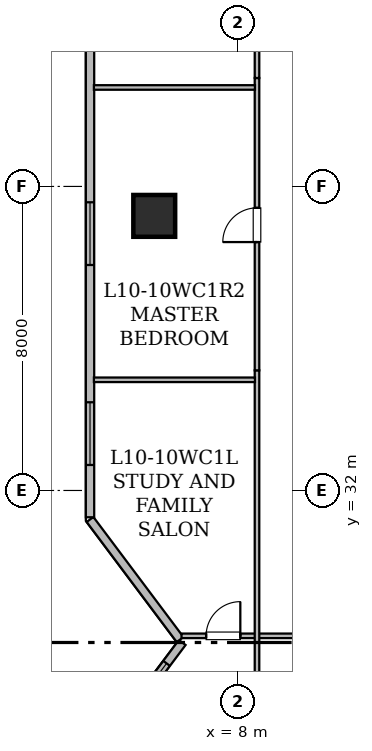
"""IFC4 building model, lengths in metres.
Left out: names, types, materials, properties, quantities, classifications, styles, units other than length and angle.
Written with IfcOpenShell. Run it as: python <this file> out.ifc"""

import sys

from ifc_helpers import new_model, si_unit, direction, frame, frame_2d, origin, origin_2d, place, context, subcontext, project, spatial, rectangle, hollow_rectangle, extrude, element, fill, save


model = new_model("IFC4")
c1 = context("Model", 3, precision=1e-05, world=origin(), true_north=direction((0.0, 1.0)))
c2 = subcontext(c1, "Body", "Model", "MODEL_VIEW")
j1 = project(units=[si_unit("LENGTHUNIT", "METRE"), si_unit("PLANEANGLEUNIT", "RADIAN")], contexts=[c1])
p1 = place(None, origin())
s1 = spatial("IfcSite", under=j1, at=p1, CompositionType="ELEMENT")
p2 = place(p1, origin())
s2 = spatial("IfcBuilding", under=s1, at=p2, CompositionType="ELEMENT")
p3 = place(p2, frame((0.0, 0.0, 44.25)))
s3 = spatial("IfcBuildingStorey", under=s2, at=p3, CompositionType="ELEMENT", Elevation=44.25)
p4 = place(p3, frame((5.8, 39.225, 0.0), z_axis=(0.0, 0.0, 1.0), x_axis=(1.0, 0.0, 0.0)))
e1 = element("IfcColumn", 1, at=p4, inside=s3, PredefinedType="COLUMN", context=c2, shape_type="SweptSolid", body=[
    extrude(hollow_rectangle(XDim=1.1, YDim=1.1, WallThickness=0.055, at=origin_2d()), origin(), (0.0, 0.0, 1.0), 3.65),
])
p5 = place(p3, frame((4.145, 24.809, 0.0), z_axis=(0.0, 0.0, 1.0), x_axis=(0.599823674734, 0.800132213592, 0.0)))
e2 = element("IfcWall", 2, at=p5, inside=s3, PredefinedType="STANDARD", context=c2, shape_type="SweptSolid", body=[
    extrude(rectangle(XDim=3.988, YDim=0.22, at=frame_2d((1.994, 0.0))), origin(), (0.0, 0.0, 1.0), 3.43),
])
p6 = place(p5, frame((1.651, 0.0, 0.85)))
e3 = element("IfcOpeningElement", 3, at=p6, cuts=e2, PredefinedType="OPENING", context=c2, shape_type="SweptSolid", body=[
    extrude(rectangle(XDim=1.65, YDim=1.55, at=frame_2d((0.825, 0.775))), frame((0.0, 0.12, 0.0), z_axis=(0.0, -1.0, 0.0), x_axis=(1.0, 0.0, 0.0)), (0.0, 0.0, 1.0), 0.24),
])
p7 = place(p3, frame((6.48, 28.077, 0.0), z_axis=(0.0, 0.0, 1.0), x_axis=(-0.599960442794, 0.800029666377, 0.0)))
e4 = element("IfcWall", 4, at=p7, inside=s3, PredefinedType="STANDARD", context=c2, shape_type="SweptSolid", body=[
    extrude(rectangle(XDim=3.95, YDim=0.22, at=frame_2d((1.975, 0.0))), origin(), (0.0, 0.0, 1.0), 3.43),
])
p8 = place(p3, frame((4.11, 31.295, 0.0), z_axis=(0.0, 0.0, 1.0), x_axis=(0.0, 1.0, 0.0)))
e5 = element("IfcWall", 5, at=p8, inside=s3, PredefinedType="STANDARD", context=c2, shape_type="SweptSolid", body=[
    extrude(rectangle(XDim=17.459, YDim=0.22, at=frame_2d((8.729, 0.0))), origin(), (0.0, 0.0, 1.0), 3.43),
])
p9 = place(p8, frame((1.376, 0.0, 0.85)))
e6 = element("IfcOpeningElement", 6, at=p9, cuts=e5, PredefinedType="OPENING", context=c2, shape_type="SweptSolid", body=[
    extrude(rectangle(XDim=1.65, YDim=1.55, at=frame_2d((0.825, 0.775))), frame((0.0, 0.12, 0.0), z_axis=(0.0, -1.0, 0.0), x_axis=(1.0, 0.0, 0.0)), (0.0, 0.0, 1.0), 0.24),
])
p10 = place(p8, frame((6.638, 0.0, 0.85)))
e7 = element("IfcOpeningElement", 7, at=p10, cuts=e5, PredefinedType="OPENING", context=c2, shape_type="SweptSolid", body=[
    extrude(rectangle(XDim=1.65, YDim=1.55, at=frame_2d((0.825, 0.775))), frame((0.0, 0.12, 0.0), z_axis=(0.0, -1.0, 0.0), x_axis=(1.0, 0.0, 0.0)), (0.0, 0.0, 1.0), 0.24),
])
p11 = place(p8, frame((12.8, 0.0, 0.85)))
e8 = element("IfcOpeningElement", 8, at=p11, cuts=e5, PredefinedType="OPENING", context=c2, shape_type="SweptSolid", body=[
    extrude(rectangle(XDim=1.65, YDim=1.55, at=frame_2d((0.825, 0.775))), frame((0.0, 0.12, 0.0), z_axis=(0.0, -1.0, 0.0), x_axis=(1.0, 0.0, 0.0)), (0.0, 0.0, 1.0), 0.24),
])
p12 = place(p3, frame((6.518, 28.175, 0.0), z_axis=(0.0, 0.0, 1.0), x_axis=(1.0, 0.0, 0.0)))
e9 = element("IfcWall", 9, at=p12, inside=s3, PredefinedType="PARTITIONING", context=c2, shape_type="SweptSolid", body=[
    extrude(rectangle(XDim=4.651, YDim=0.12, at=frame_2d((2.325, 0.0))), origin(), (0.0, 0.0, 1.0), 3.43),
])
p13 = place(p12, frame((0.647, 0.0, 0.0)))
e10 = element("IfcOpeningElement", 10, at=p13, cuts=e9, PredefinedType="OPENING", context=c2, shape_type="SweptSolid", body=[
    extrude(rectangle(XDim=0.9, YDim=2.1, at=frame_2d((0.45, 1.05))), frame((0.0, 0.07, 0.0), z_axis=(0.0, -1.0, 0.0), x_axis=(1.0, 0.0, 0.0)), (0.0, 0.0, 1.0), 0.14),
])
p14 = place(p3, frame((8.504, 25.51, 0.0), z_axis=(0.0, 0.0, 1.0), x_axis=(0.0, 1.0, 0.0)))
e11 = element("IfcWall", 11, at=p14, inside=s3, PredefinedType="PARTITIONING", context=c2, shape_type="SweptSolid", body=[
    extrude(rectangle(XDim=9.651, YDim=0.12, at=frame_2d((4.825, 0.0))), origin(), (0.0, 0.0, 1.0), 3.43),
])
p15 = place(p3, frame((8.504, 35.161, 0.0), z_axis=(0.0, 0.0, 1.0), x_axis=(0.0, 1.0, 0.0)))
e12 = element("IfcWall", 12, at=p15, inside=s3, PredefinedType="PARTITIONING", context=c2, shape_type="SweptSolid", body=[
    extrude(rectangle(XDim=7.692, YDim=0.12, at=frame_2d((3.846, 0.0))), origin(), (0.0, 0.0, 1.0), 2.647),
])
p16 = place(p15, frame((3.375, 0.0, 0.0)))
e13 = element("IfcOpeningElement", 13, at=p16, cuts=e12, PredefinedType="OPENING", context=c2, shape_type="SweptSolid", body=[
    extrude(rectangle(XDim=0.9, YDim=2.1, at=frame_2d((0.45, 1.05))), frame((0.0, 0.07, 0.0), z_axis=(0.0, -1.0, 0.0), x_axis=(1.0, 0.0, 0.0)), (0.0, 0.0, 1.0), 0.14),
])
p17 = place(p3, frame((8.504, 42.853, 0.0), z_axis=(0.0, 0.0, 1.0), x_axis=(0.0, 1.0, 0.0)))
e14 = element("IfcWall", 14, at=p17, inside=s3, PredefinedType="PARTITIONING", context=c2, shape_type="SweptSolid", body=[
    extrude(rectangle(XDim=4.633, YDim=0.12, at=frame_2d((2.316, 0.0))), origin(), (0.0, 0.0, 1.0), 2.803),
])
p18 = place(p17, frame((1.846, 0.0, 0.0)))
e15 = element("IfcOpeningElement", 15, at=p18, cuts=e14, PredefinedType="OPENING", context=c2, shape_type="SweptSolid", body=[
    extrude(rectangle(XDim=0.9, YDim=2.1, at=frame_2d((0.45, 1.05))), frame((0.0, 0.07, 0.0), z_axis=(0.0, -1.0, 0.0), x_axis=(1.0, 0.0, 0.0)), (0.0, 0.0, 1.0), 0.14),
])
for number, where, z_axis, x_axis in (
    (16, (4.212, 34.912, 0.0), (0.0, 0.0, 1.0), (1.0, 0.0, 0.0)),
    (17, (4.212, 42.604, 0.0), (0.0, 0.0, 1.0), (1.0, 0.0, 0.0)),
):
    element("IfcWall", number, at=place(p3, frame(where, z_axis=z_axis, x_axis=x_axis)), inside=s3, PredefinedType="PARTITIONING", context=c2, shape_type="SweptSolid", body=[
        extrude(rectangle(XDim=4.238, YDim=0.12, at=frame_2d((2.119, 0.0))), origin(), (0.0, 0.0, 1.0), 2.803),
    ])
p19 = place(p6, origin())
e18 = element("IfcWindow", 18, at=p19, inside=s3, PartitioningType="SINGLE_PANEL", PredefinedType="WINDOW", context=c2, shape_type="SweptSolid", body=[
    extrude(rectangle(XDim=1.65, YDim=1.55, at=frame_2d((0.825, 0.775))), frame((0.0, 0.03, 0.0), z_axis=(0.0, -1.0, 0.0), x_axis=(1.0, 0.0, 0.0)), (0.0, 0.0, 1.0), 0.06),
])
fill(e3, e18)
p20 = place(p9, origin())
e19 = element("IfcWindow", 19, at=p20, inside=s3, PartitioningType="SINGLE_PANEL", PredefinedType="WINDOW", context=c2, shape_type="SweptSolid", body=[
    extrude(rectangle(XDim=1.65, YDim=1.55, at=frame_2d((0.825, 0.775))), frame((0.0, 0.03, 0.0), z_axis=(0.0, -1.0, 0.0), x_axis=(1.0, 0.0, 0.0)), (0.0, 0.0, 1.0), 0.06),
])
fill(e6, e19)
p21 = place(p10, origin())
e20 = element("IfcWindow", 20, at=p21, inside=s3, PartitioningType="SINGLE_PANEL", PredefinedType="WINDOW", context=c2, shape_type="SweptSolid", body=[
    extrude(rectangle(XDim=1.65, YDim=1.55, at=frame_2d((0.825, 0.775))), frame((0.0, 0.03, 0.0), z_axis=(0.0, -1.0, 0.0), x_axis=(1.0, 0.0, 0.0)), (0.0, 0.0, 1.0), 0.06),
])
fill(e7, e20)
p22 = place(p13, origin())
e21 = element("IfcDoor", 21, at=p22, inside=s3, OperationType="SINGLE_SWING_RIGHT", PredefinedType="DOOR", context=c2, shape_type="SweptSolid", body=[
    extrude(rectangle(XDim=0.9, YDim=2.1, at=frame_2d((0.45, 1.05))), frame((0.0, 0.025, 0.0), z_axis=(0.0, -1.0, 0.0), x_axis=(1.0, 0.0, 0.0)), (0.0, 0.0, 1.0), 0.05),
])
fill(e10, e21)
p23 = place(p16, origin())
e22 = element("IfcDoor", 22, at=p23, inside=s3, OperationType="SINGLE_SWING_LEFT", PredefinedType="DOOR", context=c2, shape_type="SweptSolid", body=[
    extrude(rectangle(XDim=0.9, YDim=2.1, at=frame_2d((0.45, 1.05))), frame((0.0, 0.025, 0.0), z_axis=(0.0, -1.0, 0.0), x_axis=(1.0, 0.0, 0.0)), (0.0, 0.0, 1.0), 0.05),
])
fill(e13, e22)
save(model, sys.argv[1])
